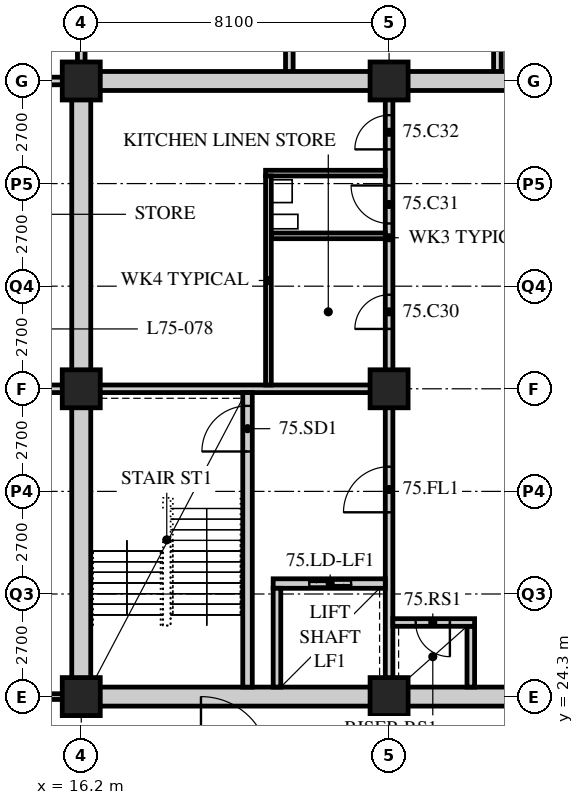
"""IFC4 building model, lengths in metres.
Left out: names, types, materials, properties, quantities, classifications, styles, units other than length and angle.
Written with IfcOpenShell. Run it as: python <this file> out.ifc"""

import sys

from ifc_helpers import new_model, si_unit, direction, frame, frame_2d, origin, origin_2d, place, context, subcontext, project, spatial, rectangle, hollow_rectangle, extrude, element, fill, save


model = new_model("IFC4")
c1 = context("Model", 3, precision=1e-05, world=origin(), true_north=direction((0.0, 1.0)))
c2 = subcontext(c1, "Body", "Model", "MODEL_VIEW")
j1 = project(units=[si_unit("LENGTHUNIT", "METRE"), si_unit("PLANEANGLEUNIT", "RADIAN")], contexts=[c1])
p1 = place(None, origin())
s1 = spatial("IfcSite", under=j1, at=p1, CompositionType="ELEMENT")
p2 = place(p1, origin())
s2 = spatial("IfcBuilding", under=s1, at=p2, CompositionType="ELEMENT")
p3 = place(p2, frame((0.0, 0.0, 293.1)))
s3 = spatial("IfcBuildingStorey", under=s2, at=p3, CompositionType="ELEMENT", Elevation=293.1)
for number, where, z_axis, x_axis in (
    (1, (16.2, 24.3, 0.0), (0.0, 0.0, 1.0), (1.0, 0.0, 0.0)),
    (2, (16.2, 32.4, 0.0), (0.0, 0.0, 1.0), (1.0, 0.0, 0.0)),
    (3, (16.2, 40.5, 0.0), (0.0, 0.0, 1.0), (1.0, 0.0, 0.0)),
    (4, (24.3, 24.3, 0.0), (0.0, 0.0, 1.0), (1.0, 0.0, 0.0)),
    (5, (24.3, 32.4, 0.0), (0.0, 0.0, 1.0), (1.0, 0.0, 0.0)),
    (6, (24.3, 40.5, 0.0), (0.0, 0.0, 1.0), (1.0, 0.0, 0.0)),
):
    element("IfcColumn", number, at=place(p3, frame(where, z_axis=z_axis, x_axis=x_axis)), inside=s3, PredefinedType="COLUMN", context=c2, shape_type="SweptSolid", body=[
        extrude(hollow_rectangle(XDim=1.0, YDim=1.0, WallThickness=0.1, at=origin_2d()), origin(), (0.0, 0.0, 1.0), 5.4),
    ])
p4 = place(p3, frame((9.9, 24.3, 0.0), z_axis=(0.0, 0.0, 1.0), x_axis=(1.0, 0.0, 0.0)))
e7 = element("IfcWall", 7, at=p4, inside=s3, PredefinedType="PARTITIONING", context=c2, shape_type="SweptSolid", body=[
    extrude(rectangle(XDim=6.1, YDim=0.15, at=frame_2d((3.05, 0.0))), origin(), (0.0, 0.0, 1.0), 4.271),
])
p5 = place(p3, frame((9.9, 32.4, 0.0), z_axis=(0.0, 0.0, 1.0), x_axis=(1.0, 0.0, 0.0)))
e8 = element("IfcWall", 8, at=p5, inside=s3, PredefinedType="SOLIDWALL", context=c2, shape_type="SweptSolid", body=[
    extrude(rectangle(XDim=6.3, YDim=0.2, at=frame_2d((3.15, 0.0))), origin(), (0.0, 0.0, 1.0), 4.271),
])
p6 = place(p3, frame((16.2, 40.5, 0.0), z_axis=(0.0, 0.0, 1.0), x_axis=(0.0, 1.0, 0.0)))
e9 = element("IfcWall", 9, at=p6, inside=s3, PredefinedType="SOLIDWALL", context=c2, shape_type="SweptSolid", body=[
    extrude(rectangle(XDim=14.4, YDim=0.2, at=frame_2d((7.2, 0.0))), origin(), (0.0, 0.0, 1.0), 4.271),
])
for number, where, z_axis, x_axis in (
    (10, (21.675, 54.9, 0.0), (0.0, 0.0, 1.0), (0.0, -1.0, 0.0)),
    (11, (27.15, 40.5, 0.0), (0.0, 0.0, 1.0), (0.0, 1.0, 0.0)),
):
    element("IfcWall", number, at=place(p3, frame(where, z_axis=z_axis, x_axis=x_axis)), inside=s3, PredefinedType="SOLIDWALL", context=c2, shape_type="SweptSolid", body=[
        extrude(rectangle(XDim=14.4, YDim=0.2, at=frame_2d((7.2, 0.0))), origin(), (0.0, 0.0, 1.0), 5.19),
    ])
p7 = place(p3, frame((9.9, 40.5, 0.0), z_axis=(0.0, 0.0, 1.0), x_axis=(1.0, 0.0, 0.0)))
e12 = element("IfcWall", 12, at=p7, inside=s3, PredefinedType="SOLIDWALL", context=c2, shape_type="SweptSolid", body=[
    extrude(rectangle(XDim=6.3, YDim=0.2, at=frame_2d((3.15, 0.0))), origin(), (0.0, 0.0, 1.0), 4.271),
])
p8 = place(p3, frame((15.95, 24.3, 0.0), z_axis=(0.0, 0.0, 1.0), x_axis=(1.0, 0.0, 0.0)))
e13 = element("IfcWall", 13, at=p8, inside=s3, PredefinedType="SOLIDWALL", context=c2, shape_type="SweptSolid", body=[
    extrude(rectangle(XDim=24.8, YDim=0.5, at=frame_2d((12.4, 0.0))), origin(), (0.0, 0.0, 1.0), 4.271),
])
p9 = place(p8, frame((11.5, 0.0, 0.0)))
e14 = element("IfcOpeningElement", 14, at=p9, cuts=e13, PredefinedType="OPENING", context=c2, shape_type="SweptSolid", body=[
    extrude(rectangle(XDim=1.8, YDim=2.4, at=frame_2d((0.9, 1.2))), frame((0.0, 0.26, 0.0), z_axis=(0.0, -1.0, 0.0), x_axis=(1.0, 0.0, 0.0)), (0.0, 0.0, 1.0), 0.52),
])
p10 = place(p3, frame((15.95, 40.5, 0.0), z_axis=(0.0, 0.0, 1.0), x_axis=(1.0, 0.0, 0.0)))
e15 = element("IfcWall", 15, at=p10, inside=s3, PredefinedType="SOLIDWALL", context=c2, shape_type="SweptSolid", body=[
    extrude(rectangle(XDim=24.8, YDim=0.5, at=frame_2d((12.4, 0.0))), origin(), (0.0, 0.0, 1.0), 4.271),
])
p11 = place(p10, frame((11.5, 0.0, 0.0)))
e16 = element("IfcOpeningElement", 16, at=p11, cuts=e15, PredefinedType="OPENING", context=c2, shape_type="SweptSolid", body=[
    extrude(rectangle(XDim=1.8, YDim=2.4, at=frame_2d((0.9, 1.2))), frame((0.0, 0.26, 0.0), z_axis=(0.0, -1.0, 0.0), x_axis=(1.0, 0.0, 0.0)), (0.0, 0.0, 1.0), 0.52),
])
p12 = place(p3, frame((16.2, 24.55, 0.0), z_axis=(0.0, 0.0, 1.0), x_axis=(0.0, 1.0, 0.0)))
e17 = element("IfcWall", 17, at=p12, inside=s3, PredefinedType="SOLIDWALL", context=c2, shape_type="SweptSolid", body=[
    extrude(rectangle(XDim=15.7, YDim=0.5, at=frame_2d((7.85, 0.0))), origin(), (0.0, 0.0, 1.0), 4.271),
])
p13 = place(p3, frame((16.45, 32.4, 0.0), z_axis=(0.0, 0.0, 1.0), x_axis=(1.0, 0.0, 0.0)))
e18 = element("IfcWall", 18, at=p13, inside=s3, PredefinedType="SOLIDWALL", context=c2, shape_type="SweptSolid", body=[
    extrude(rectangle(XDim=7.95, YDim=0.2, at=frame_2d((3.975, 0.0))), origin(), (0.0, 0.0, 1.0), 4.428),
])
p14 = place(p3, frame((24.3, 24.55, 0.0), z_axis=(0.0, 0.0, 1.0), x_axis=(0.0, 1.0, 0.0)))
e19 = element("IfcWall", 19, at=p14, inside=s3, PredefinedType="SOLIDWALL", context=c2, shape_type="SweptSolid", body=[
    extrude(rectangle(XDim=7.75, YDim=0.2, at=frame_2d((3.875, 0.0))), origin(), (0.0, 0.0, 1.0), 4.428),
])
p15 = place(p14, frame((4.6, 0.0, 0.0)))
e20 = element("IfcOpeningElement", 20, at=p15, cuts=e19, PredefinedType="OPENING", context=c2, shape_type="SweptSolid", body=[
    extrude(rectangle(XDim=1.2, YDim=2.1, at=frame_2d((0.6, 1.05))), frame((0.0, 0.11, 0.0), z_axis=(0.0, -1.0, 0.0), x_axis=(1.0, 0.0, 0.0)), (0.0, 0.0, 1.0), 0.22),
])
p16 = place(p3, frame((20.575, 24.55, 0.0), z_axis=(0.0, 0.0, 1.0), x_axis=(0.0, 1.0, 0.0)))
e21 = element("IfcWall", 21, at=p16, inside=s3, PredefinedType="SOLIDWALL", context=c2, shape_type="SweptSolid", body=[
    extrude(rectangle(XDim=7.75, YDim=0.25, at=frame_2d((3.875, 0.0))), origin(), (0.0, 0.0, 1.0), 5.19),
])
p17 = place(p16, frame((6.2, 0.0, 0.0)))
e22 = element("IfcOpeningElement", 22, at=p17, cuts=e21, PredefinedType="OPENING", context=c2, shape_type="SweptSolid", body=[
    extrude(rectangle(XDim=1.2, YDim=2.1, at=frame_2d((0.6, 1.05))), frame((0.0, 0.135, 0.0), z_axis=(0.0, -1.0, 0.0), x_axis=(1.0, 0.0, 0.0)), (0.0, 0.0, 1.0), 0.27),
])
p18 = place(p3, frame((21.25, 27.275, 0.0), z_axis=(0.0, 0.0, 1.0), x_axis=(1.0, 0.0, 0.0)))
e23 = element("IfcWall", 23, at=p18, inside=s3, PredefinedType="SOLIDWALL", context=c2, shape_type="SweptSolid", body=[
    extrude(rectangle(XDim=2.95, YDim=0.25, at=frame_2d((1.475, 0.0))), origin(), (0.0, 0.0, 1.0), 5.19),
])
p19 = place(p18, frame((0.95, 0.0, 0.0)))
e24 = element("IfcOpeningElement", 24, at=p19, cuts=e23, PredefinedType="OPENING", context=c2, shape_type="SweptSolid", body=[
    extrude(rectangle(XDim=1.1, YDim=2.4, at=frame_2d((0.55, 1.2))), frame((0.0, 0.135, 0.0), z_axis=(0.0, -1.0, 0.0), x_axis=(1.0, 0.0, 0.0)), (0.0, 0.0, 1.0), 0.27),
])
p20 = place(p3, frame((21.35, 24.55, 0.0), z_axis=(0.0, 0.0, 1.0), x_axis=(0.0, 1.0, 0.0)))
e25 = element("IfcWall", 25, at=p20, inside=s3, PredefinedType="SOLIDWALL", context=c2, shape_type="SweptSolid", body=[
    extrude(rectangle(XDim=2.6, YDim=0.2, at=frame_2d((1.3, 0.0))), origin(), (0.0, 0.0, 1.0), 5.19),
])
p21 = place(p3, frame((26.45, 24.55, 0.0), z_axis=(0.0, 0.0, 1.0), x_axis=(0.0, 1.0, 0.0)))
e26 = element("IfcWall", 26, at=p21, inside=s3, PredefinedType="SOLIDWALL", context=c2, shape_type="SweptSolid", body=[
    extrude(rectangle(XDim=1.6, YDim=0.2, at=frame_2d((0.8, 0.0))), origin(), (0.0, 0.0, 1.0), 5.19),
])
p22 = place(p3, frame((24.4, 26.25, 0.0), z_axis=(0.0, 0.0, 1.0), x_axis=(1.0, 0.0, 0.0)))
e27 = element("IfcWall", 27, at=p22, inside=s3, PredefinedType="SOLIDWALL", context=c2, shape_type="SweptSolid", body=[
    extrude(rectangle(XDim=2.15, YDim=0.2, at=frame_2d((1.075, 0.0))), origin(), (0.0, 0.0, 1.0), 5.19),
])
p23 = place(p22, frame((0.6, 0.0, 0.0)))
e28 = element("IfcOpeningElement", 28, at=p23, cuts=e27, PredefinedType="OPENING", context=c2, shape_type="SweptSolid", body=[
    extrude(rectangle(XDim=0.9, YDim=2.1, at=frame_2d((0.45, 1.05))), frame((0.0, 0.11, 0.0), z_axis=(0.0, -1.0, 0.0), x_axis=(1.0, 0.0, 0.0)), (0.0, 0.0, 1.0), 0.22),
])
p24 = place(p3, frame((24.3, 32.5, 0.0), z_axis=(0.0, 0.0, 1.0), x_axis=(0.0, 1.0, 0.0)))
e29 = element("IfcWall", 29, at=p24, inside=s3, PredefinedType="PARTITIONING", context=c2, shape_type="SweptSolid", body=[
    extrude(rectangle(XDim=7.75, YDim=0.2, at=frame_2d((3.875, 0.0))), origin(), (0.0, 0.0, 1.0), 4.428),
])
p25 = place(p24, frame((1.475, 0.0, 0.0)))
e30 = element("IfcOpeningElement", 30, at=p25, cuts=e29, PredefinedType="OPENING", context=c2, shape_type="SweptSolid", body=[
    extrude(rectangle(XDim=0.9, YDim=2.1, at=frame_2d((0.45, 1.05))), frame((0.0, 0.11, 0.0), z_axis=(0.0, -1.0, 0.0), x_axis=(1.0, 0.0, 0.0)), (0.0, 0.0, 1.0), 0.22),
])
p26 = place(p24, frame((4.25, 0.0, 0.0)))
e31 = element("IfcOpeningElement", 31, at=p26, cuts=e29, PredefinedType="OPENING", context=c2, shape_type="SweptSolid", body=[
    extrude(rectangle(XDim=1.0, YDim=2.1, at=frame_2d((0.5, 1.05))), frame((0.0, 0.11, 0.0), z_axis=(0.0, -1.0, 0.0), x_axis=(1.0, 0.0, 0.0)), (0.0, 0.0, 1.0), 0.22),
])
p27 = place(p24, frame((6.2, 0.0, 0.0)))
e32 = element("IfcOpeningElement", 32, at=p27, cuts=e29, PredefinedType="OPENING", context=c2, shape_type="SweptSolid", body=[
    extrude(rectangle(XDim=0.9, YDim=2.1, at=frame_2d((0.45, 1.05))), frame((0.0, 0.11, 0.0), z_axis=(0.0, -1.0, 0.0), x_axis=(1.0, 0.0, 0.0)), (0.0, 0.0, 1.0), 0.22),
])
p28 = place(p3, frame((21.2, 36.425, 0.0), z_axis=(0.0, 0.0, 1.0), x_axis=(1.0, 0.0, 0.0)))
e33 = element("IfcWall", 33, at=p28, inside=s3, PredefinedType="PARTITIONING", context=c2, shape_type="SweptSolid", body=[
    extrude(rectangle(XDim=3.0, YDim=0.15, at=frame_2d((1.5, 0.0))), origin(), (0.0, 0.0, 1.0), 5.19),
])
p29 = place(p3, frame((21.05, 38.075, 0.0), z_axis=(0.0, 0.0, 1.0), x_axis=(1.0, 0.0, 0.0)))
e34 = element("IfcWall", 34, at=p29, inside=s3, PredefinedType="PARTITIONING", context=c2, shape_type="SweptSolid", body=[
    extrude(rectangle(XDim=3.15, YDim=0.15, at=frame_2d((1.575, 0.0))), origin(), (0.0, 0.0, 1.0), 5.19),
])
p30 = place(p3, frame((21.125, 32.5, 0.0), z_axis=(0.0, 0.0, 1.0), x_axis=(0.0, 1.0, 0.0)))
e35 = element("IfcWall", 35, at=p30, inside=s3, PredefinedType="PARTITIONING", context=c2, shape_type="SweptSolid", body=[
    extrude(rectangle(XDim=5.5, YDim=0.15, at=frame_2d((2.75, 0.0))), origin(), (0.0, 0.0, 1.0), 5.19),
])
p31 = place(p25, origin())
e36 = element("IfcDoor", 36, at=p31, inside=s3, OperationType="SINGLE_SWING_LEFT", PredefinedType="DOOR", context=c2, shape_type="SweptSolid", body=[
    extrude(rectangle(XDim=0.9, YDim=2.1, at=frame_2d((0.45, 1.05))), frame((0.0, 0.025, 0.0), z_axis=(0.0, -1.0, 0.0), x_axis=(1.0, 0.0, 0.0)), (0.0, 0.0, 1.0), 0.05),
])
fill(e30, e36)
p32 = place(p26, origin())
e37 = element("IfcDoor", 37, at=p32, inside=s3, OperationType="SINGLE_SWING_RIGHT", PredefinedType="DOOR", context=c2, shape_type="SweptSolid", body=[
    extrude(rectangle(XDim=1.0, YDim=2.1, at=frame_2d((0.5, 1.05))), frame((0.0, 0.025, 0.0), z_axis=(0.0, -1.0, 0.0), x_axis=(1.0, 0.0, 0.0)), (0.0, 0.0, 1.0), 0.05),
])
fill(e31, e37)
p33 = place(p27, origin())
e38 = element("IfcDoor", 38, at=p33, inside=s3, OperationType="SINGLE_SWING_LEFT", PredefinedType="DOOR", context=c2, shape_type="SweptSolid", body=[
    extrude(rectangle(XDim=0.9, YDim=2.1, at=frame_2d((0.45, 1.05))), frame((0.0, 0.025, 0.0), z_axis=(0.0, -1.0, 0.0), x_axis=(1.0, 0.0, 0.0)), (0.0, 0.0, 1.0), 0.05),
])
fill(e32, e38)
p34 = place(p17, origin())
e39 = element("IfcDoor", 39, at=p34, inside=s3, OperationType="SINGLE_SWING_LEFT", PredefinedType="DOOR", context=c2, shape_type="SweptSolid", body=[
    extrude(rectangle(XDim=1.2, YDim=2.1, at=frame_2d((0.6, 1.05))), frame((0.0, 0.025, 0.0), z_axis=(0.0, -1.0, 0.0), x_axis=(1.0, 0.0, 0.0)), (0.0, 0.0, 1.0), 0.05),
])
fill(e22, e39)
p35 = place(p15, origin())
e40 = element("IfcDoor", 40, at=p35, inside=s3, OperationType="SINGLE_SWING_LEFT", PredefinedType="DOOR", context=c2, shape_type="SweptSolid", body=[
    extrude(rectangle(XDim=1.2, YDim=2.1, at=frame_2d((0.6, 1.05))), frame((0.0, 0.025, 0.0), z_axis=(0.0, -1.0, 0.0), x_axis=(1.0, 0.0, 0.0)), (0.0, 0.0, 1.0), 0.05),
])
fill(e20, e40)
p36 = place(p23, origin())
e41 = element("IfcDoor", 41, at=p36, inside=s3, OperationType="SINGLE_SWING_LEFT", PredefinedType="DOOR", context=c2, shape_type="SweptSolid", body=[
    extrude(rectangle(XDim=0.9, YDim=2.1, at=frame_2d((0.45, 1.05))), frame((0.0, 0.025, 0.0), z_axis=(0.0, -1.0, 0.0), x_axis=(1.0, 0.0, 0.0)), (0.0, 0.0, 1.0), 0.05),
])
fill(e28, e41)
p37 = place(p19, origin())
e42 = element("IfcDoor", 42, at=p37, inside=s3, OperationType="DOUBLE_DOOR_SLIDING", PredefinedType="DOOR", context=c2, shape_type="SweptSolid", body=[
    extrude(rectangle(XDim=1.1, YDim=2.4, at=frame_2d((0.55, 1.2))), frame((0.0, 0.025, 0.0), z_axis=(0.0, -1.0, 0.0), x_axis=(1.0, 0.0, 0.0)), (0.0, 0.0, 1.0), 0.05),
])
fill(e24, e42)
save(model, sys.argv[1])
